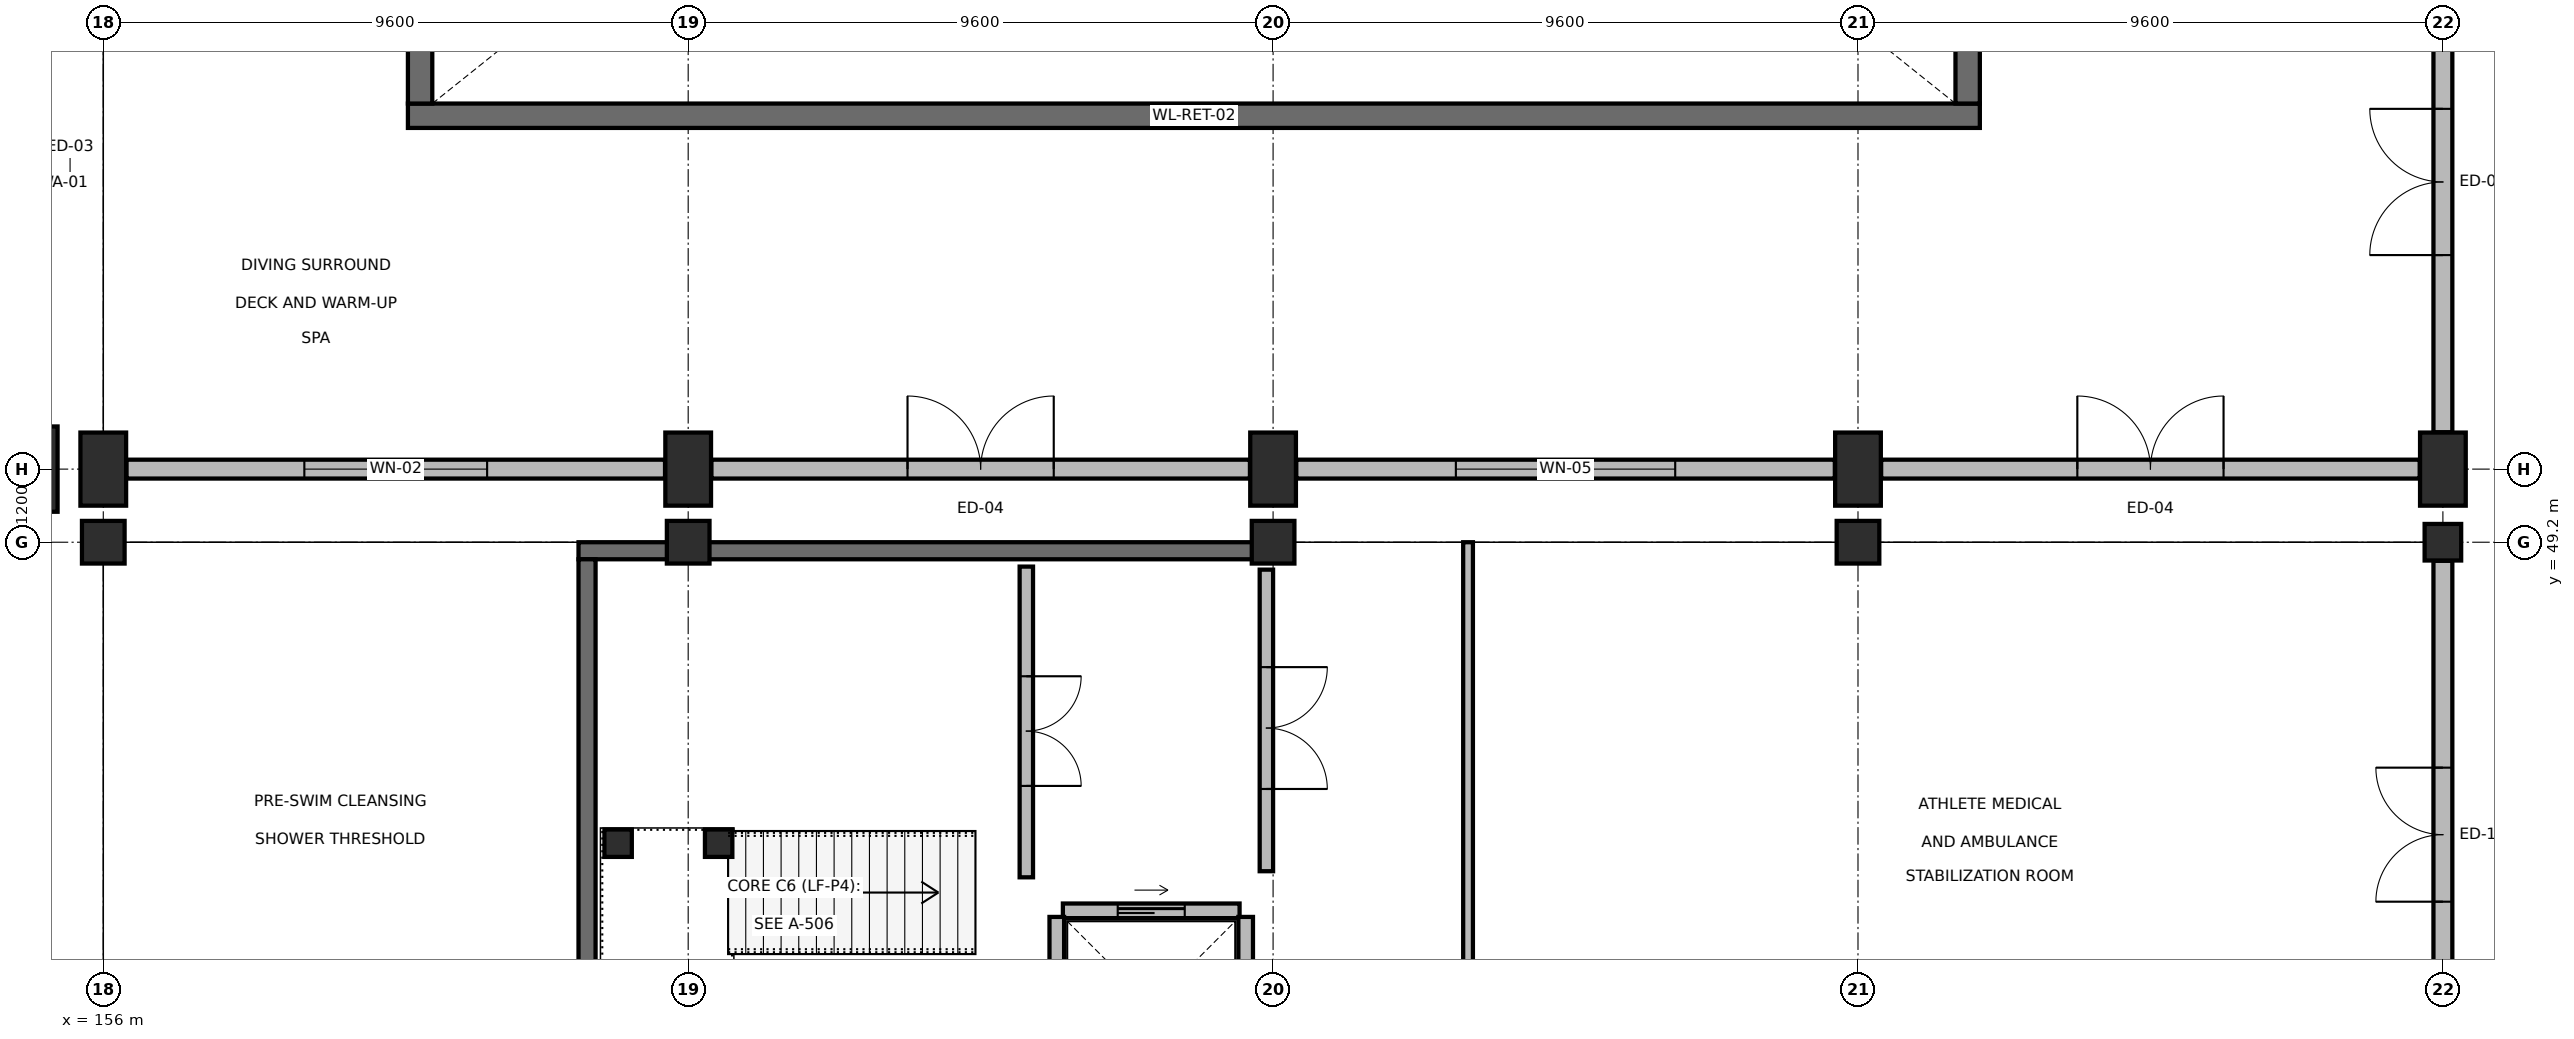
"""IFC4 building model, lengths in metres.
Left out: names, types, materials, properties, quantities, classifications, styles, units other than length and angle.
Written with IfcOpenShell. Run it as: python <this file> out.ifc"""

import sys

from ifc_helpers import new_model, si_unit, direction, frame, frame_2d, origin, origin_2d, place, context, subcontext, project, spatial, rectangle, extrude, element, fill, save


model = new_model("IFC4")
c1 = context("Model", 3, precision=1e-05, world=origin(), true_north=direction((0.0, 1.0)))
c2 = subcontext(c1, "Body", "Model", "MODEL_VIEW")
j1 = project(units=[si_unit("LENGTHUNIT", "METRE"), si_unit("PLANEANGLEUNIT", "RADIAN")], contexts=[c1])
p1 = place(None, origin())
s1 = spatial("IfcSite", under=j1, at=p1, CompositionType="ELEMENT")
p2 = place(p1, origin())
s2 = spatial("IfcBuilding", under=s1, at=p2, CompositionType="ELEMENT")
p3 = place(p2, origin())
s3 = spatial("IfcBuildingStorey", under=s2, at=p3, CompositionType="ELEMENT", Elevation=0.0)
for number, where, z_axis, x_axis in (
    (1, (156.0, 50.4, 0.0), (0.0, 0.0, 1.0), (1.0, 0.0, 0.0)),
    (2, (165.6, 50.4, 0.0), (0.0, 0.0, 1.0), (1.0, 0.0, 0.0)),
    (3, (175.2, 50.4, 0.0), (0.0, 0.0, 1.0), (1.0, 0.0, 0.0)),
    (4, (184.8, 50.4, 0.0), (0.0, 0.0, 1.0), (1.0, 0.0, 0.0)),
    (5, (194.4, 50.4, 0.0), (0.0, 0.0, 1.0), (1.0, 0.0, 0.0)),
):
    element("IfcColumn", number, at=place(p3, frame(where, z_axis=z_axis, x_axis=x_axis)), inside=s3, PredefinedType="COLUMN", context=c2, shape_type="SweptSolid", body=[
        extrude(rectangle(XDim=0.75, YDim=1.2, at=origin_2d()), origin(), (0.0, 0.0, 1.0), 4.8),
    ])
p4 = place(p3, frame((154.8, 50.4, 0.0), z_axis=(0.0, 0.0, 1.0), x_axis=(1.0, 0.0, 0.0)))
e6 = element("IfcColumn", 6, at=p4, inside=s3, PredefinedType="COLUMN", context=c2, shape_type="SweptSolid", body=[
    extrude(rectangle(XDim=0.9, YDim=1.4, at=origin_2d()), origin(), (0.0, 0.0, 1.0), 4.8),
])
for number, where, z_axis, x_axis in (
    (7, (156.0, 49.2, 0.0), (0.0, 0.0, 1.0), (1.0, 0.0, 0.0)),
    (8, (165.6, 49.2, 0.0), (0.0, 0.0, 1.0), (1.0, 0.0, 0.0)),
    (9, (175.2, 49.2, 0.0), (0.0, 0.0, 1.0), (1.0, 0.0, 0.0)),
    (10, (184.8, 49.2, 0.0), (0.0, 0.0, 1.0), (1.0, 0.0, 0.0)),
):
    element("IfcColumn", number, at=place(p3, frame(where, z_axis=z_axis, x_axis=x_axis)), inside=s3, PredefinedType="COLUMN", context=c2, shape_type="SweptSolid", body=[
        extrude(rectangle(XDim=0.7, YDim=0.7, at=origin_2d()), origin(), (0.0, 0.0, 1.0), 4.8),
    ])
p5 = place(p3, frame((194.4, 49.2, 0.0), z_axis=(0.0, 0.0, 1.0), x_axis=(1.0, 0.0, 0.0)))
e11 = element("IfcColumn", 11, at=p5, inside=s3, PredefinedType="COLUMN", context=c2, shape_type="SweptSolid", body=[
    extrude(rectangle(XDim=0.6, YDim=0.6, at=origin_2d()), origin(), (0.0, 0.0, 1.0), 4.8),
])
p6 = place(p3, frame((161.0, 56.2, -5.0), z_axis=(0.0, 0.0, 1.0), x_axis=(1.0, 0.0, 0.0)))
e12 = element("IfcWall", 12, at=p6, inside=s3, PredefinedType="USERDEFINED", context=c2, shape_type="SweptSolid", body=[
    extrude(rectangle(XDim=25.8, YDim=0.4, at=frame_2d((12.9, 0.0))), origin(), (0.0, 0.0, 1.0), 5.08),
])
for number, where, z_axis, x_axis in (
    (13, (161.2, 56.4, -5.0), (0.0, 0.0, 1.0), (0.0, 1.0, 0.0)),
    (14, (186.6, 56.4, -5.0), (0.0, 0.0, 1.0), (0.0, 1.0, 0.0)),
):
    element("IfcWall", number, at=place(p3, frame(where, z_axis=z_axis, x_axis=x_axis)), inside=s3, PredefinedType="USERDEFINED", context=c2, shape_type="SweptSolid", body=[
        extrude(rectangle(XDim=20.0, YDim=0.4, at=frame_2d((10.0, 0.0))), origin(), (0.0, 0.0, 1.0), 5.08),
    ])
p7 = place(p3, frame((163.8, 49.06, 0.0), z_axis=(0.0, 0.0, 1.0), x_axis=(1.0, 0.0, 0.0)))
e15 = element("IfcWall", 15, at=p7, inside=s3, PredefinedType="SHEAR", context=c2, shape_type="SweptSolid", body=[
    extrude(rectangle(XDim=11.4, YDim=0.28, at=frame_2d((5.7, 0.0))), origin(), (0.0, 0.0, 1.0), 4.8),
])
p8 = place(p3, frame((163.94, 39.88, 0.0), z_axis=(0.0, 0.0, 1.0), x_axis=(0.0, 1.0, 0.0)))
e16 = element("IfcWall", 16, at=p8, inside=s3, PredefinedType="SHEAR", context=c2, shape_type="SweptSolid", body=[
    extrude(rectangle(XDim=9.04, YDim=0.28, at=frame_2d((4.52, 0.0))), origin(), (0.0, 0.0, 1.0), 4.8),
])
p9 = place(p3, frame((165.22, 50.4, 0.0), z_axis=(0.0, 0.0, 1.0), x_axis=(-1.0, 0.0, 0.0)))
e17 = element("IfcWall", 17, at=p9, inside=s3, PredefinedType="SOLIDWALL", context=c2, shape_type="SweptSolid", body=[
    extrude(rectangle(XDim=8.84, YDim=0.31, at=frame_2d((4.42, 0.0))), origin(), (0.0, 0.0, 1.0), 3.935),
])
p10 = place(p9, frame((2.92, 0.0, 0.95)))
e18 = element("IfcOpeningElement", 18, at=p10, cuts=e17, PredefinedType="OPENING", context=c2, shape_type="SweptSolid", body=[
    extrude(rectangle(XDim=3.0, YDim=0.9, at=frame_2d((1.5, 0.45))), frame((0.0, 0.165, 0.0), z_axis=(0.0, -1.0, 0.0), x_axis=(1.0, 0.0, 0.0)), (0.0, 0.0, 1.0), 0.33),
])
p11 = place(p3, frame((174.82, 50.4, 0.0), z_axis=(0.0, 0.0, 1.0), x_axis=(-1.0, 0.0, 0.0)))
e19 = element("IfcWall", 19, at=p11, inside=s3, PredefinedType="SOLIDWALL", context=c2, shape_type="SweptSolid", body=[
    extrude(rectangle(XDim=8.84, YDim=0.31, at=frame_2d((4.42, 0.0))), origin(), (0.0, 0.0, 1.0), 3.935),
])
p12 = place(p11, frame((3.22, 0.0, 0.0)))
e20 = element("IfcOpeningElement", 20, at=p12, cuts=e19, PredefinedType="OPENING", context=c2, shape_type="SweptSolid", body=[
    extrude(rectangle(XDim=2.4, YDim=2.4, at=frame_2d((1.2, 1.2))), frame((0.0, 0.165, 0.0), z_axis=(0.0, -1.0, 0.0), x_axis=(1.0, 0.0, 0.0)), (0.0, 0.0, 1.0), 0.33),
])
p13 = place(p3, frame((184.42, 50.4, 0.0), z_axis=(0.0, 0.0, 1.0), x_axis=(-1.0, 0.0, 0.0)))
e21 = element("IfcWall", 21, at=p13, inside=s3, PredefinedType="SOLIDWALL", context=c2, shape_type="SweptSolid", body=[
    extrude(rectangle(XDim=8.84, YDim=0.31, at=frame_2d((4.42, 0.0))), origin(), (0.0, 0.0, 1.0), 3.935),
])
p14 = place(p13, frame((2.62, 0.0, 0.95)))
e22 = element("IfcOpeningElement", 22, at=p14, cuts=e21, PredefinedType="OPENING", context=c2, shape_type="SweptSolid", body=[
    extrude(rectangle(XDim=3.6, YDim=1.2, at=frame_2d((1.8, 0.6))), frame((0.0, 0.165, 0.0), z_axis=(0.0, -1.0, 0.0), x_axis=(1.0, 0.0, 0.0)), (0.0, 0.0, 1.0), 0.33),
])
p15 = place(p3, frame((194.02, 50.4, 0.0), z_axis=(0.0, 0.0, 1.0), x_axis=(-1.0, 0.0, 0.0)))
e23 = element("IfcWall", 23, at=p15, inside=s3, PredefinedType="SOLIDWALL", context=c2, shape_type="SweptSolid", body=[
    extrude(rectangle(XDim=8.84, YDim=0.31, at=frame_2d((4.42, 0.0))), origin(), (0.0, 0.0, 1.0), 3.935),
])
p16 = place(p15, frame((3.22, 0.0, 0.0)))
e24 = element("IfcOpeningElement", 24, at=p16, cuts=e23, PredefinedType="OPENING", context=c2, shape_type="SweptSolid", body=[
    extrude(rectangle(XDim=2.4, YDim=2.4, at=frame_2d((1.2, 1.2))), frame((0.0, 0.165, 0.0), z_axis=(0.0, -1.0, 0.0), x_axis=(1.0, 0.0, 0.0)), (0.0, 0.0, 1.0), 0.33),
])
p17 = place(p3, frame((194.4, 59.22, 0.0), z_axis=(0.0, 0.0, 1.0), x_axis=(0.0, -1.0, 0.0)))
e25 = element("IfcWall", 25, at=p17, inside=s3, PredefinedType="SOLIDWALL", context=c2, shape_type="SweptSolid", body=[
    extrude(rectangle(XDim=8.215, YDim=0.31, at=frame_2d((4.107, 0.0))), origin(), (0.0, 0.0, 1.0), 3.95),
])
p18 = place(p17, frame((2.907, 0.0, 0.0)))
e26 = element("IfcOpeningElement", 26, at=p18, cuts=e25, PredefinedType="OPENING", context=c2, shape_type="SweptSolid", body=[
    extrude(rectangle(XDim=2.4, YDim=2.4, at=frame_2d((1.2, 1.2))), frame((0.0, 0.165, 0.0), z_axis=(0.0, -1.0, 0.0), x_axis=(1.0, 0.0, 0.0)), (0.0, 0.0, 1.0), 0.33),
])
p19 = place(p3, frame((194.4, 48.895, 0.0), z_axis=(0.0, 0.0, 1.0), x_axis=(0.0, -1.0, 0.0)))
e27 = element("IfcWall", 27, at=p19, inside=s3, PredefinedType="SOLIDWALL", context=c2, shape_type="SweptSolid", body=[
    extrude(rectangle(XDim=8.99, YDim=0.31, at=frame_2d((4.495, 0.0))), origin(), (0.0, 0.0, 1.0), 3.825),
])
p20 = place(p19, frame((3.395, 0.0, 0.0)))
e28 = element("IfcOpeningElement", 28, at=p20, cuts=e27, PredefinedType="OPENING", context=c2, shape_type="SweptSolid", body=[
    extrude(rectangle(XDim=2.2, YDim=2.5, at=frame_2d((1.1, 1.25))), frame((0.0, 0.165, 0.0), z_axis=(0.0, -1.0, 0.0), x_axis=(1.0, 0.0, 0.0)), (0.0, 0.0, 1.0), 0.33),
])
p21 = place(p3, frame((171.15, 43.7, 0.0), z_axis=(0.0, 0.0, 1.0), x_axis=(0.0, 1.0, 0.0)))
e29 = element("IfcWall", 29, at=p21, inside=s3, PredefinedType="PARTITIONING", context=c2, shape_type="SweptSolid", body=[
    extrude(rectangle(XDim=5.1, YDim=0.22, at=frame_2d((2.55, 0.0))), origin(), (0.0, 0.0, 1.0), 4.505),
])
p22 = place(p21, frame((1.5, 0.0, 0.0)))
e30 = element("IfcOpeningElement", 30, at=p22, cuts=e29, PredefinedType="OPENING", context=c2, shape_type="SweptSolid", body=[
    extrude(rectangle(XDim=1.8, YDim=2.2, at=frame_2d((0.9, 1.1))), frame((0.0, 0.12, 0.0), z_axis=(0.0, -1.0, 0.0), x_axis=(1.0, 0.0, 0.0)), (0.0, 0.0, 1.0), 0.24),
])
p23 = place(p3, frame((171.75, 43.15, 0.0), z_axis=(0.0, 0.0, 1.0), x_axis=(1.0, 0.0, 0.0)))
e31 = element("IfcWall", 31, at=p23, inside=s3, PredefinedType="SOLIDWALL", context=c2, shape_type="SweptSolid", body=[
    extrude(rectangle(XDim=2.9, YDim=0.24, at=frame_2d((1.45, 0.0))), origin(), (0.0, 0.0, 1.0), 4.505),
])
p24 = place(p23, frame((0.9, 0.0, 0.0)))
e32 = element("IfcOpeningElement", 32, at=p24, cuts=e31, PredefinedType="OPENING", context=c2, shape_type="SweptSolid", body=[
    extrude(rectangle(XDim=1.1, YDim=2.15, at=frame_2d((0.55, 1.075))), frame((0.0, 0.13, 0.0), z_axis=(0.0, -1.0, 0.0), x_axis=(1.0, 0.0, 0.0)), (0.0, 0.0, 1.0), 0.26),
])
for number, where, z_axis, x_axis in (
    (33, (171.65, 40.05, 0.0), (0.0, 0.0, 1.0), (0.0, 1.0, 0.0)),
    (34, (174.75, 40.05, 0.0), (0.0, 0.0, 1.0), (0.0, 1.0, 0.0)),
):
    element("IfcWall", number, at=place(p3, frame(where, z_axis=z_axis, x_axis=x_axis)), inside=s3, PredefinedType="SOLIDWALL", context=c2, shape_type="SweptSolid", body=[
        extrude(rectangle(XDim=3.0, YDim=0.24, at=frame_2d((1.5, 0.0))), origin(), (0.0, 0.0, 1.0), 4.505),
    ])
p25 = place(p3, frame((175.09, 43.8, 0.0), z_axis=(0.0, 0.0, 1.0), x_axis=(0.0, 1.0, 0.0)))
e35 = element("IfcWall", 35, at=p25, inside=s3, PredefinedType="PARTITIONING", context=c2, shape_type="SweptSolid", body=[
    extrude(rectangle(XDim=4.95, YDim=0.22, at=frame_2d((2.475, 0.0))), origin(), (0.0, 0.0, 1.0), 3.925),
])
p26 = place(p25, frame((1.35, 0.0, 0.0)))
e36 = element("IfcOpeningElement", 36, at=p26, cuts=e35, PredefinedType="OPENING", context=c2, shape_type="SweptSolid", body=[
    extrude(rectangle(XDim=2.0, YDim=2.2, at=frame_2d((1.0, 1.1))), frame((0.0, 0.12, 0.0), z_axis=(0.0, -1.0, 0.0), x_axis=(1.0, 0.0, 0.0)), (0.0, 0.0, 1.0), 0.24),
])
p27 = place(p3, frame((178.4, 39.6, 0.0), z_axis=(0.0, 0.0, 1.0), x_axis=(0.0, 1.0, 0.0)))
e37 = element("IfcWall", 37, at=p27, inside=s3, PredefinedType="PARTITIONING", context=c2, shape_type="SweptSolid", body=[
    extrude(rectangle(XDim=9.6, YDim=0.16, at=frame_2d((4.8, 0.0))), origin(), (0.0, 0.0, 1.0), 3.825),
])
for number, where, z_axis, x_axis in (
    (38, (164.45, 44.26, 0.0), (0.0, 0.0, 1.0), (1.0, 0.0, 0.0)),
    (39, (166.1, 44.26, 0.0), (0.0, 0.0, 1.0), (1.0, 0.0, 0.0)),
):
    element("IfcColumn", number, at=place(p3, frame(where, z_axis=z_axis, x_axis=x_axis)), inside=s3, PredefinedType="COLUMN", context=c2, shape_type="SweptSolid", body=[
        extrude(rectangle(XDim=0.45, YDim=0.45, at=origin_2d()), origin(), (0.0, 0.0, 1.0), 4.8),
    ])
p28 = place(p10, origin())
e40 = element("IfcWindow", 40, at=p28, inside=s3, PartitioningType="SINGLE_PANEL", PredefinedType="WINDOW", context=c2, shape_type="SweptSolid", body=[
    extrude(rectangle(XDim=3.0, YDim=0.9, at=frame_2d((1.5, 0.45))), frame((0.0, 0.03, 0.0), z_axis=(0.0, -1.0, 0.0), x_axis=(1.0, 0.0, 0.0)), (0.0, 0.0, 1.0), 0.06),
])
fill(e18, e40)
p29 = place(p12, origin())
e41 = element("IfcDoor", 41, at=p29, inside=s3, OperationType="DOUBLE_DOOR_SINGLE_SWING", PredefinedType="DOOR", context=c2, shape_type="SweptSolid", body=[
    extrude(rectangle(XDim=2.4, YDim=2.4, at=frame_2d((1.2, 1.2))), frame((0.0, 0.025, 0.0), z_axis=(0.0, -1.0, 0.0), x_axis=(1.0, 0.0, 0.0)), (0.0, 0.0, 1.0), 0.05),
])
fill(e20, e41)
p30 = place(p14, origin())
e42 = element("IfcWindow", 42, at=p30, inside=s3, PartitioningType="SINGLE_PANEL", PredefinedType="WINDOW", context=c2, shape_type="SweptSolid", body=[
    extrude(rectangle(XDim=3.6, YDim=1.2, at=frame_2d((1.8, 0.6))), frame((0.0, 0.03, 0.0), z_axis=(0.0, -1.0, 0.0), x_axis=(1.0, 0.0, 0.0)), (0.0, 0.0, 1.0), 0.06),
])
fill(e22, e42)
p31 = place(p16, origin())
e43 = element("IfcDoor", 43, at=p31, inside=s3, OperationType="DOUBLE_DOOR_SINGLE_SWING", PredefinedType="DOOR", context=c2, shape_type="SweptSolid", body=[
    extrude(rectangle(XDim=2.4, YDim=2.4, at=frame_2d((1.2, 1.2))), frame((0.0, 0.025, 0.0), z_axis=(0.0, -1.0, 0.0), x_axis=(1.0, 0.0, 0.0)), (0.0, 0.0, 1.0), 0.05),
])
fill(e24, e43)
p32 = place(p18, origin())
e44 = element("IfcDoor", 44, at=p32, inside=s3, OperationType="DOUBLE_DOOR_SINGLE_SWING", PredefinedType="DOOR", context=c2, shape_type="SweptSolid", body=[
    extrude(rectangle(XDim=2.4, YDim=2.4, at=frame_2d((1.2, 1.2))), frame((0.0, 0.025, 0.0), z_axis=(0.0, -1.0, 0.0), x_axis=(1.0, 0.0, 0.0)), (0.0, 0.0, 1.0), 0.05),
])
fill(e26, e44)
p33 = place(p20, origin())
e45 = element("IfcDoor", 45, at=p33, inside=s3, OperationType="DOUBLE_DOOR_SINGLE_SWING", PredefinedType="DOOR", context=c2, shape_type="SweptSolid", body=[
    extrude(rectangle(XDim=2.2, YDim=2.5, at=frame_2d((1.1, 1.25))), frame((0.0, 0.025, 0.0), z_axis=(0.0, -1.0, 0.0), x_axis=(1.0, 0.0, 0.0)), (0.0, 0.0, 1.0), 0.05),
])
fill(e28, e45)
p34 = place(p22, origin())
e46 = element("IfcDoor", 46, at=p34, inside=s3, OperationType="DOUBLE_DOOR_SINGLE_SWING", PredefinedType="DOOR", context=c2, shape_type="SweptSolid", body=[
    extrude(rectangle(XDim=1.8, YDim=2.2, at=frame_2d((0.9, 1.1))), frame((0.0, 0.025, 0.0), z_axis=(0.0, -1.0, 0.0), x_axis=(1.0, 0.0, 0.0)), (0.0, 0.0, 1.0), 0.05),
])
fill(e30, e46)
p35 = place(p24, origin())
e47 = element("IfcDoor", 47, at=p35, inside=s3, OperationType="DOUBLE_DOOR_SLIDING", PredefinedType="DOOR", context=c2, shape_type="SweptSolid", body=[
    extrude(rectangle(XDim=1.1, YDim=2.15, at=frame_2d((0.55, 1.075))), frame((0.0, 0.025, 0.0), z_axis=(0.0, -1.0, 0.0), x_axis=(1.0, 0.0, 0.0)), (0.0, 0.0, 1.0), 0.05),
])
fill(e32, e47)
p36 = place(p26, origin())
e48 = element("IfcDoor", 48, at=p36, inside=s3, OperationType="DOUBLE_DOOR_SINGLE_SWING", PredefinedType="DOOR", context=c2, shape_type="SweptSolid", body=[
    extrude(rectangle(XDim=2.0, YDim=2.2, at=frame_2d((1.0, 1.1))), frame((0.0, 0.025, 0.0), z_axis=(0.0, -1.0, 0.0), x_axis=(1.0, 0.0, 0.0)), (0.0, 0.0, 1.0), 0.05),
])
fill(e36, e48)
save(model, sys.argv[1])
